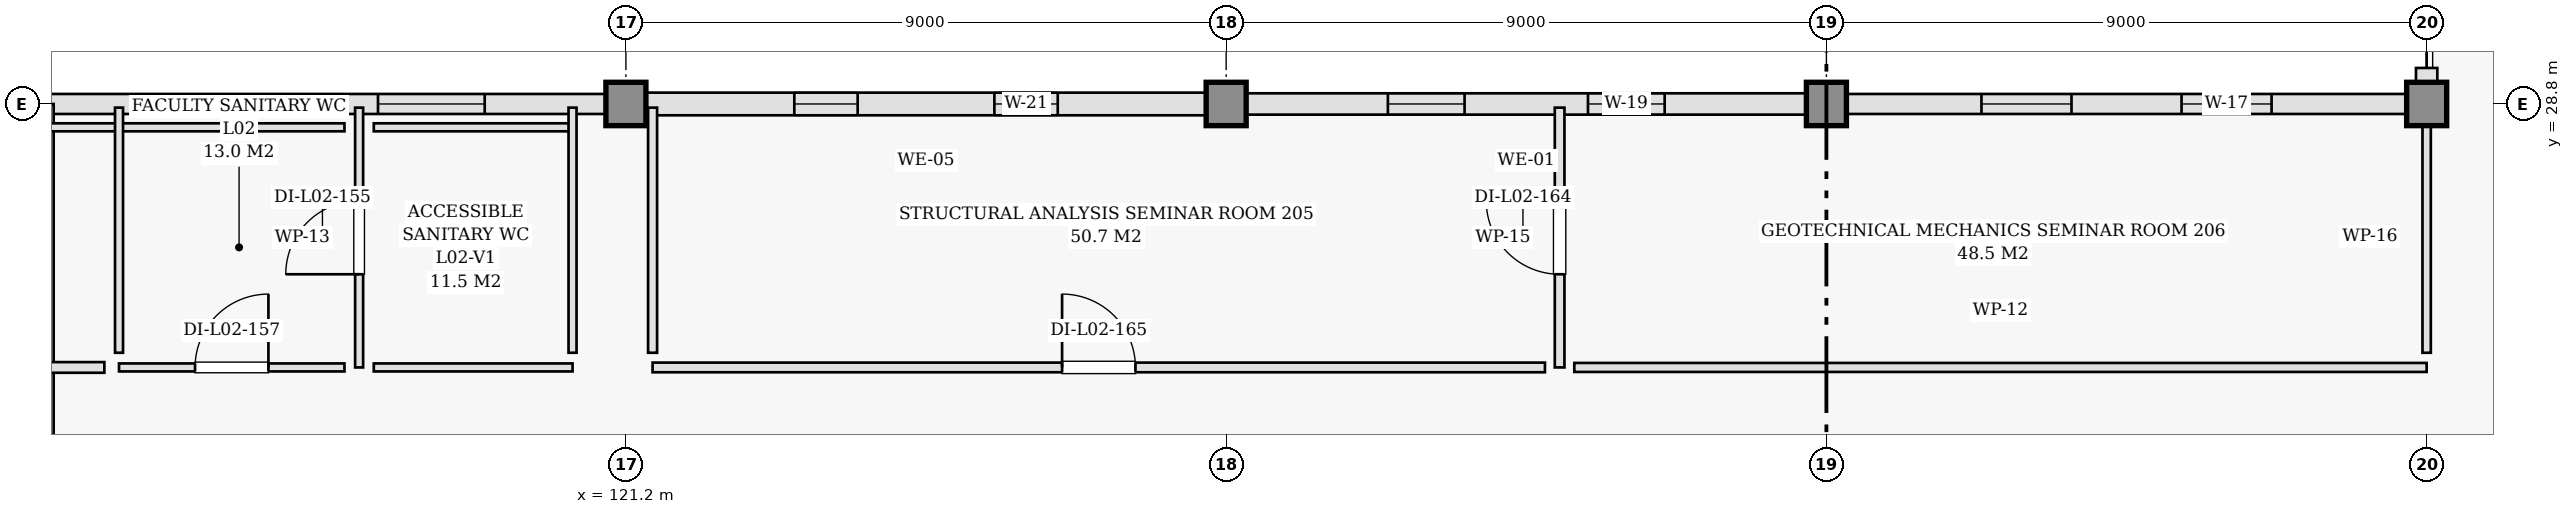
"""IFC4 building model, lengths in metres.
Left out: names, types, materials, properties, quantities, classifications, styles, units other than length and angle.
Written with IfcOpenShell. Run it as: python <this file> out.ifc"""

import sys

from ifc_helpers import new_model, si_unit, direction, frame, frame_2d, origin, origin_2d, place, context, subcontext, project, spatial, rectangle, extrude, element, fill, save


model = new_model("IFC4")
c1 = context("Model", 3, precision=1e-05, world=origin(), true_north=direction((0.0, 1.0)))
c2 = subcontext(c1, "Body", "Model", "MODEL_VIEW")
j1 = project(units=[si_unit("LENGTHUNIT", "METRE"), si_unit("PLANEANGLEUNIT", "RADIAN")], contexts=[c1])
p1 = place(None, origin())
s1 = spatial("IfcSite", under=j1, at=p1, CompositionType="ELEMENT")
p2 = place(p1, origin())
s2 = spatial("IfcBuilding", under=s1, at=p2, CompositionType="ELEMENT")
p3 = place(p2, frame((0.0, 0.0, 9.6)))
s3 = spatial("IfcBuildingStorey", under=s2, at=p3, CompositionType="ELEMENT", Elevation=9.6)
for number, where, z_axis, x_axis in (
    (1, (121.2, 28.8, 0.0), (0.0, 0.0, 1.0), (1.0, 0.0, 0.0)),
    (2, (130.2, 28.8, 0.0), (0.0, 0.0, 1.0), (1.0, 0.0, 0.0)),
    (3, (139.2, 28.8, 0.0), (0.0, 0.0, 1.0), (1.0, 0.0, 0.0)),
    (4, (148.2, 28.8, 0.0), (0.0, 0.0, 1.0), (1.0, 0.0, 0.0)),
):
    element("IfcColumn", number, at=place(p3, frame(where, z_axis=z_axis, x_axis=x_axis)), inside=s3, PredefinedType="COLUMN", context=c2, shape_type="SweptSolid", body=[
        extrude(rectangle(XDim=0.65, YDim=0.65, at=origin_2d()), origin(), (0.0, 0.0, 1.0), 4.2),
    ])
p4 = place(p3, frame((148.2, 29.34, 0.0), z_axis=(0.0, 0.0, 1.0), x_axis=(0.0, -1.0, 0.0)))
e5 = element("IfcWall", 5, at=p4, inside=s3, PredefinedType="SOLIDWALL", context=c2, shape_type="SweptSolid", body=[
    extrude(rectangle(XDim=0.388, YDim=0.32, at=frame_2d((0.194, 0.0))), origin(), (0.0, 0.0, 1.0), 3.125),
])
p5 = place(p3, frame((148.2, 28.8, 0.0), z_axis=(0.0, 0.0, 1.0), x_axis=(-1.0, 0.0, 0.0)))
e6 = element("IfcWall", 6, at=p5, inside=s3, PredefinedType="SOLIDWALL", context=c2, shape_type="SweptSolid", body=[
    extrude(rectangle(XDim=9.0, YDim=0.3, at=frame_2d((4.5, 0.0))), origin(), (0.0, 0.0, 1.0), 3.125),
])
p6 = place(p5, frame((2.325, 0.0, 0.9)))
e7 = element("IfcOpeningElement", 7, at=p6, cuts=e6, PredefinedType="OPENING", context=c2, shape_type="SweptSolid", body=[
    extrude(rectangle(XDim=1.35, YDim=1.55, at=frame_2d((0.675, 0.775))), frame((0.0, 0.16, 0.0), z_axis=(0.0, -1.0, 0.0), x_axis=(1.0, 0.0, 0.0)), (0.0, 0.0, 1.0), 0.32),
])
p7 = place(p5, frame((5.325, 0.0, 0.9)))
e8 = element("IfcOpeningElement", 8, at=p7, cuts=e6, PredefinedType="OPENING", context=c2, shape_type="SweptSolid", body=[
    extrude(rectangle(XDim=1.35, YDim=1.55, at=frame_2d((0.675, 0.775))), frame((0.0, 0.16, 0.0), z_axis=(0.0, -1.0, 0.0), x_axis=(1.0, 0.0, 0.0)), (0.0, 0.0, 1.0), 0.32),
])
p8 = place(p3, frame((139.2, 28.8, 0.0), z_axis=(0.0, 0.0, 1.0), x_axis=(-1.0, 0.0, 0.0)))
e9 = element("IfcWall", 9, at=p8, inside=s3, PredefinedType="SOLIDWALL", context=c2, shape_type="SweptSolid", body=[
    extrude(rectangle(XDim=9.0, YDim=0.32, at=frame_2d((4.5, 0.0))), origin(), (0.0, 0.0, 1.0), 3.125),
])
p9 = place(p8, frame((2.425, 0.0, 0.9)))
e10 = element("IfcOpeningElement", 10, at=p9, cuts=e9, PredefinedType="OPENING", context=c2, shape_type="SweptSolid", body=[
    extrude(rectangle(XDim=1.15, YDim=1.45, at=frame_2d((0.575, 0.725))), frame((0.0, 0.17, 0.0), z_axis=(0.0, -1.0, 0.0), x_axis=(1.0, 0.0, 0.0)), (0.0, 0.0, 1.0), 0.34),
])
p10 = place(p8, frame((5.425, 0.0, 0.9)))
e11 = element("IfcOpeningElement", 11, at=p10, cuts=e9, PredefinedType="OPENING", context=c2, shape_type="SweptSolid", body=[
    extrude(rectangle(XDim=1.15, YDim=1.45, at=frame_2d((0.575, 0.725))), frame((0.0, 0.17, 0.0), z_axis=(0.0, -1.0, 0.0), x_axis=(1.0, 0.0, 0.0)), (0.0, 0.0, 1.0), 0.34),
])
p11 = place(p3, frame((130.2, 28.8, 0.0), z_axis=(0.0, 0.0, 1.0), x_axis=(-1.0, 0.0, 0.0)))
e12 = element("IfcWall", 12, at=p11, inside=s3, PredefinedType="SOLIDWALL", context=c2, shape_type="SweptSolid", body=[
    extrude(rectangle(XDim=9.0, YDim=0.34, at=frame_2d((4.5, 0.0))), origin(), (0.0, 0.0, 1.0), 3.125),
])
p12 = place(p11, frame((2.525, 0.0, 0.9)))
e13 = element("IfcOpeningElement", 13, at=p12, cuts=e12, PredefinedType="OPENING", context=c2, shape_type="SweptSolid", body=[
    extrude(rectangle(XDim=0.95, YDim=1.35, at=frame_2d((0.475, 0.675))), frame((0.0, 0.18, 0.0), z_axis=(0.0, -1.0, 0.0), x_axis=(1.0, 0.0, 0.0)), (0.0, 0.0, 1.0), 0.36),
])
p13 = place(p11, frame((5.525, 0.0, 0.9)))
e14 = element("IfcOpeningElement", 14, at=p13, cuts=e12, PredefinedType="OPENING", context=c2, shape_type="SweptSolid", body=[
    extrude(rectangle(XDim=0.95, YDim=1.35, at=frame_2d((0.475, 0.675))), frame((0.0, 0.18, 0.0), z_axis=(0.0, -1.0, 0.0), x_axis=(1.0, 0.0, 0.0)), (0.0, 0.0, 1.0), 0.36),
])
p14 = place(p3, frame((121.2, 28.8, 0.0), z_axis=(0.0, 0.0, 1.0), x_axis=(-1.0, 0.0, 0.0)))
e15 = element("IfcWall", 15, at=p14, inside=s3, PredefinedType="SOLIDWALL", context=c2, shape_type="SweptSolid", body=[
    extrude(rectangle(XDim=8.75, YDim=0.3, at=frame_2d((4.375, 0.0))), origin(), (0.0, 0.0, 1.0), 3.125),
])
p15 = place(p14, frame((2.117, 0.0, 0.9)))
e16 = element("IfcOpeningElement", 16, at=p15, cuts=e15, PredefinedType="OPENING", context=c2, shape_type="SweptSolid", body=[
    extrude(rectangle(XDim=1.6, YDim=1.6, at=frame_2d((0.8, 0.8))), frame((0.0, 0.16, 0.0), z_axis=(0.0, -1.0, 0.0), x_axis=(1.0, 0.0, 0.0)), (0.0, 0.0, 1.0), 0.32),
])
p16 = place(p14, frame((5.033, 0.0, 0.9)))
e17 = element("IfcOpeningElement", 17, at=p16, cuts=e15, PredefinedType="OPENING", context=c2, shape_type="SweptSolid", body=[
    extrude(rectangle(XDim=1.6, YDim=1.6, at=frame_2d((0.8, 0.8))), frame((0.0, 0.16, 0.0), z_axis=(0.0, -1.0, 0.0), x_axis=(1.0, 0.0, 0.0)), (0.0, 0.0, 1.0), 0.32),
])
p17 = place(p3, frame((112.45, 28.8, 0.0), z_axis=(0.0, 0.0, 1.0), x_axis=(0.0, -1.0, 0.0)))
e18 = element("IfcWall", 18, at=p17, inside=s3, PredefinedType="SOLIDWALL", context=c2, shape_type="SweptSolid", body=[
    extrude(rectangle(XDim=7.2, YDim=0.34, at=frame_2d((3.6, 0.0))), origin(), (0.0, 0.0, 1.0), 3.125),
])
p18 = place(p3, frame((117.2, 24.85, 0.0), z_axis=(0.0, 0.0, 1.0), x_axis=(0.0, 1.0, 0.0)))
e19 = element("IfcWall", 19, at=p18, inside=s3, PredefinedType="PARTITIONING", context=c2, shape_type="SweptSolid", body=[
    extrude(rectangle(XDim=3.895, YDim=0.12, at=frame_2d((1.948, 0.0))), origin(), (0.0, 0.0, 1.0), 3.125),
])
p19 = place(p18, frame((1.397, 0.0, 0.0)))
e20 = element("IfcOpeningElement", 20, at=p19, cuts=e19, PredefinedType="OPENING", context=c2, shape_type="SweptSolid", body=[
    extrude(rectangle(XDim=1.1, YDim=2.15, at=frame_2d((0.55, 1.075))), frame((0.0, 0.07, 0.0), z_axis=(0.0, -1.0, 0.0), x_axis=(1.0, 0.0, 0.0)), (0.0, 0.0, 1.0), 0.14),
])
for number, where, z_axis, x_axis in (
    (21, (117.42, 24.85, 0.0), (0.0, 0.0, 1.0), (1.0, 0.0, 0.0)),
    (22, (117.42, 28.45, 0.0), (0.0, 0.0, 1.0), (1.0, 0.0, 0.0)),
):
    element("IfcWall", number, at=place(p3, frame(where, z_axis=z_axis, x_axis=x_axis)), inside=s3, PredefinedType="PARTITIONING", context=c2, shape_type="SweptSolid", body=[
        extrude(rectangle(XDim=2.98, YDim=0.12, at=frame_2d((1.49, 0.0))), origin(), (0.0, 0.0, 1.0), 3.94),
    ])
p20 = place(p3, frame((120.4, 25.07, 0.0), z_axis=(0.0, 0.0, 1.0), x_axis=(0.0, 1.0, 0.0)))
e23 = element("IfcWall", 23, at=p20, inside=s3, PredefinedType="PARTITIONING", context=c2, shape_type="SweptSolid", body=[
    extrude(rectangle(XDim=3.675, YDim=0.12, at=frame_2d((1.837, 0.0))), origin(), (0.0, 0.0, 1.0), 3.125),
])
p21 = place(p3, frame((112.505, 28.45, 0.0), z_axis=(0.0, 0.0, 1.0), x_axis=(1.0, 0.0, 0.0)))
e24 = element("IfcWall", 24, at=p21, inside=s3, PredefinedType="PARTITIONING", context=c2, shape_type="SweptSolid", body=[
    extrude(rectangle(XDim=4.475, YDim=0.12, at=frame_2d((2.238, 0.0))), origin(), (0.0, 0.0, 1.0), 3.94),
])
p22 = place(p3, frame((113.6, 24.85, 0.0), z_axis=(0.0, 0.0, 1.0), x_axis=(1.0, 0.0, 0.0)))
e25 = element("IfcWall", 25, at=p22, inside=s3, PredefinedType="PARTITIONING", context=c2, shape_type="SweptSolid", body=[
    extrude(rectangle(XDim=3.38, YDim=0.12, at=frame_2d((1.69, 0.0))), origin(), (0.0, 0.0, 1.0), 3.94),
])
p23 = place(p22, frame((1.14, 0.0, 0.0)))
e26 = element("IfcOpeningElement", 26, at=p23, cuts=e25, PredefinedType="OPENING", context=c2, shape_type="SweptSolid", body=[
    extrude(rectangle(XDim=1.1, YDim=2.15, at=frame_2d((0.55, 1.075))), frame((0.0, 0.07, 0.0), z_axis=(0.0, -1.0, 0.0), x_axis=(1.0, 0.0, 0.0)), (0.0, 0.0, 1.0), 0.14),
])
p24 = place(p3, frame((113.6, 25.07, 0.0), z_axis=(0.0, 0.0, 1.0), x_axis=(0.0, 1.0, 0.0)))
e27 = element("IfcWall", 27, at=p24, inside=s3, PredefinedType="PARTITIONING", context=c2, shape_type="SweptSolid", body=[
    extrude(rectangle(XDim=3.675, YDim=0.12, at=frame_2d((1.837, 0.0))), origin(), (0.0, 0.0, 1.0), 3.125),
])
p25 = place(p3, frame((135.2, 24.85, 0.0), z_axis=(0.0, 0.0, 1.0), x_axis=(0.0, 1.0, 0.0)))
e28 = element("IfcWall", 28, at=p25, inside=s3, PredefinedType="PARTITIONING", context=c2, shape_type="SweptSolid", body=[
    extrude(rectangle(XDim=3.895, YDim=0.145, at=frame_2d((1.948, 0.0))), origin(), (0.0, 0.0, 1.0), 3.125),
])
p26 = place(p25, frame((1.397, 0.0, 0.0)))
e29 = element("IfcOpeningElement", 29, at=p26, cuts=e28, PredefinedType="OPENING", context=c2, shape_type="SweptSolid", body=[
    extrude(rectangle(XDim=1.1, YDim=2.15, at=frame_2d((0.55, 1.075))), frame((0.0, 0.083, 0.0), z_axis=(0.0, -1.0, 0.0), x_axis=(1.0, 0.0, 0.0)), (0.0, 0.0, 1.0), 0.165),
])
p27 = place(p3, frame((135.42, 24.85, 0.0), z_axis=(0.0, 0.0, 1.0), x_axis=(1.0, 0.0, 0.0)))
e30 = element("IfcWall", 30, at=p27, inside=s3, PredefinedType="PARTITIONING", context=c2, shape_type="SweptSolid", body=[
    extrude(rectangle(XDim=12.78, YDim=0.135, at=frame_2d((6.39, 0.0))), origin(), (0.0, 0.0, 1.0), 3.275),
])
p28 = place(p3, frame((148.2, 25.07, 0.0), z_axis=(0.0, 0.0, 1.0), x_axis=(0.0, 1.0, 0.0)))
e31 = element("IfcWall", 31, at=p28, inside=s3, PredefinedType="PARTITIONING", context=c2, shape_type="SweptSolid", body=[
    extrude(rectangle(XDim=3.49, YDim=0.125, at=frame_2d((1.745, 0.0))), origin(), (0.0, 0.0, 1.0), 3.275),
])
p29 = place(p3, frame((121.6, 24.85, 0.0), z_axis=(0.0, 0.0, 1.0), x_axis=(1.0, 0.0, 0.0)))
e32 = element("IfcWall", 32, at=p29, inside=s3, PredefinedType="PARTITIONING", context=c2, shape_type="SweptSolid", body=[
    extrude(rectangle(XDim=13.38, YDim=0.145, at=frame_2d((6.69, 0.0))), origin(), (0.0, 0.0, 1.0), 3.94),
])
p30 = place(p29, frame((6.14, 0.0, 0.0)))
e33 = element("IfcOpeningElement", 33, at=p30, cuts=e32, PredefinedType="OPENING", context=c2, shape_type="SweptSolid", body=[
    extrude(rectangle(XDim=1.1, YDim=2.15, at=frame_2d((0.55, 1.075))), frame((0.0, 0.083, 0.0), z_axis=(0.0, -1.0, 0.0), x_axis=(1.0, 0.0, 0.0)), (0.0, 0.0, 1.0), 0.165),
])
p31 = place(p3, frame((121.6, 25.07, 0.0), z_axis=(0.0, 0.0, 1.0), x_axis=(0.0, 1.0, 0.0)))
e34 = element("IfcWall", 34, at=p31, inside=s3, PredefinedType="PARTITIONING", context=c2, shape_type="SweptSolid", body=[
    extrude(rectangle(XDim=3.675, YDim=0.135, at=frame_2d((1.837, 0.0))), origin(), (0.0, 0.0, 1.0), 3.125),
])
p32 = place(p3, frame((112.505, 24.85, 0.0), z_axis=(0.0, 0.0, 1.0), x_axis=(1.0, 0.0, 0.0)))
e35 = element("IfcWall", 35, at=p32, inside=s3, PredefinedType="PARTITIONING", context=c2, shape_type="SweptSolid", body=[
    extrude(rectangle(XDim=0.875, YDim=0.16, at=frame_2d((0.438, 0.0))), origin(), (0.0, 0.0, 1.0), 3.94),
])
p33 = place(p6, origin())
e36 = element("IfcWindow", 36, at=p33, inside=s3, PartitioningType="DOUBLE_PANEL_VERTICAL", PredefinedType="WINDOW", context=c2, shape_type="SweptSolid", body=[
    extrude(rectangle(XDim=1.35, YDim=1.55, at=frame_2d((0.675, 0.775))), frame((0.0, 0.03, 0.0), z_axis=(0.0, -1.0, 0.0), x_axis=(1.0, 0.0, 0.0)), (0.0, 0.0, 1.0), 0.06),
])
fill(e7, e36)
p34 = place(p7, origin())
e37 = element("IfcWindow", 37, at=p34, inside=s3, PartitioningType="DOUBLE_PANEL_VERTICAL", PredefinedType="WINDOW", context=c2, shape_type="SweptSolid", body=[
    extrude(rectangle(XDim=1.35, YDim=1.55, at=frame_2d((0.675, 0.775))), frame((0.0, 0.03, 0.0), z_axis=(0.0, -1.0, 0.0), x_axis=(1.0, 0.0, 0.0)), (0.0, 0.0, 1.0), 0.06),
])
fill(e8, e37)
p35 = place(p9, origin())
e38 = element("IfcWindow", 38, at=p35, inside=s3, PartitioningType="DOUBLE_PANEL_VERTICAL", PredefinedType="WINDOW", context=c2, shape_type="SweptSolid", body=[
    extrude(rectangle(XDim=1.15, YDim=1.45, at=frame_2d((0.575, 0.725))), frame((0.0, 0.03, 0.0), z_axis=(0.0, -1.0, 0.0), x_axis=(1.0, 0.0, 0.0)), (0.0, 0.0, 1.0), 0.06),
])
fill(e10, e38)
p36 = place(p10, origin())
e39 = element("IfcWindow", 39, at=p36, inside=s3, PartitioningType="DOUBLE_PANEL_VERTICAL", PredefinedType="WINDOW", context=c2, shape_type="SweptSolid", body=[
    extrude(rectangle(XDim=1.15, YDim=1.45, at=frame_2d((0.575, 0.725))), frame((0.0, 0.03, 0.0), z_axis=(0.0, -1.0, 0.0), x_axis=(1.0, 0.0, 0.0)), (0.0, 0.0, 1.0), 0.06),
])
fill(e11, e39)
p37 = place(p12, origin())
e40 = element("IfcWindow", 40, at=p37, inside=s3, PartitioningType="DOUBLE_PANEL_VERTICAL", PredefinedType="WINDOW", context=c2, shape_type="SweptSolid", body=[
    extrude(rectangle(XDim=0.95, YDim=1.35, at=frame_2d((0.475, 0.675))), frame((0.0, 0.03, 0.0), z_axis=(0.0, -1.0, 0.0), x_axis=(1.0, 0.0, 0.0)), (0.0, 0.0, 1.0), 0.06),
])
fill(e13, e40)
p38 = place(p13, origin())
e41 = element("IfcWindow", 41, at=p38, inside=s3, PartitioningType="DOUBLE_PANEL_VERTICAL", PredefinedType="WINDOW", context=c2, shape_type="SweptSolid", body=[
    extrude(rectangle(XDim=0.95, YDim=1.35, at=frame_2d((0.475, 0.675))), frame((0.0, 0.03, 0.0), z_axis=(0.0, -1.0, 0.0), x_axis=(1.0, 0.0, 0.0)), (0.0, 0.0, 1.0), 0.06),
])
fill(e14, e41)
p39 = place(p15, origin())
e42 = element("IfcWindow", 42, at=p39, inside=s3, PartitioningType="DOUBLE_PANEL_VERTICAL", PredefinedType="WINDOW", context=c2, shape_type="SweptSolid", body=[
    extrude(rectangle(XDim=1.6, YDim=1.6, at=frame_2d((0.8, 0.8))), frame((0.0, 0.03, 0.0), z_axis=(0.0, -1.0, 0.0), x_axis=(1.0, 0.0, 0.0)), (0.0, 0.0, 1.0), 0.06),
])
fill(e16, e42)
p40 = place(p16, origin())
e43 = element("IfcWindow", 43, at=p40, inside=s3, PartitioningType="DOUBLE_PANEL_VERTICAL", PredefinedType="WINDOW", context=c2, shape_type="SweptSolid", body=[
    extrude(rectangle(XDim=1.6, YDim=1.6, at=frame_2d((0.8, 0.8))), frame((0.0, 0.03, 0.0), z_axis=(0.0, -1.0, 0.0), x_axis=(1.0, 0.0, 0.0)), (0.0, 0.0, 1.0), 0.06),
])
fill(e17, e43)
p41 = place(p19, origin())
e44 = element("IfcDoor", 44, at=p41, inside=s3, OperationType="SINGLE_SWING_LEFT", PredefinedType="DOOR", context=c2, shape_type="SweptSolid", body=[
    extrude(rectangle(XDim=1.1, YDim=2.15, at=frame_2d((0.55, 1.075))), frame((0.0, 0.025, 0.0), z_axis=(0.0, -1.0, 0.0), x_axis=(1.0, 0.0, 0.0)), (0.0, 0.0, 1.0), 0.05),
])
fill(e20, e44)
p42 = place(p23, origin())
e45 = element("IfcDoor", 45, at=p42, inside=s3, OperationType="SINGLE_SWING_RIGHT", PredefinedType="DOOR", context=c2, shape_type="SweptSolid", body=[
    extrude(rectangle(XDim=1.1, YDim=2.15, at=frame_2d((0.55, 1.075))), frame((0.0, 0.025, 0.0), z_axis=(0.0, -1.0, 0.0), x_axis=(1.0, 0.0, 0.0)), (0.0, 0.0, 1.0), 0.05),
])
fill(e26, e45)
p43 = place(p26, origin())
e46 = element("IfcDoor", 46, at=p43, inside=s3, OperationType="SINGLE_SWING_RIGHT", PredefinedType="DOOR", context=c2, shape_type="SweptSolid", body=[
    extrude(rectangle(XDim=1.1, YDim=2.15, at=frame_2d((0.55, 1.075))), frame((0.0, 0.025, 0.0), z_axis=(0.0, -1.0, 0.0), x_axis=(1.0, 0.0, 0.0)), (0.0, 0.0, 1.0), 0.05),
])
fill(e29, e46)
p44 = place(p30, origin())
e47 = element("IfcDoor", 47, at=p44, inside=s3, OperationType="SINGLE_SWING_LEFT", PredefinedType="DOOR", context=c2, shape_type="SweptSolid", body=[
    extrude(rectangle(XDim=1.1, YDim=2.15, at=frame_2d((0.55, 1.075))), frame((0.0, 0.025, 0.0), z_axis=(0.0, -1.0, 0.0), x_axis=(1.0, 0.0, 0.0)), (0.0, 0.0, 1.0), 0.05),
])
fill(e33, e47)
save(model, sys.argv[1])
